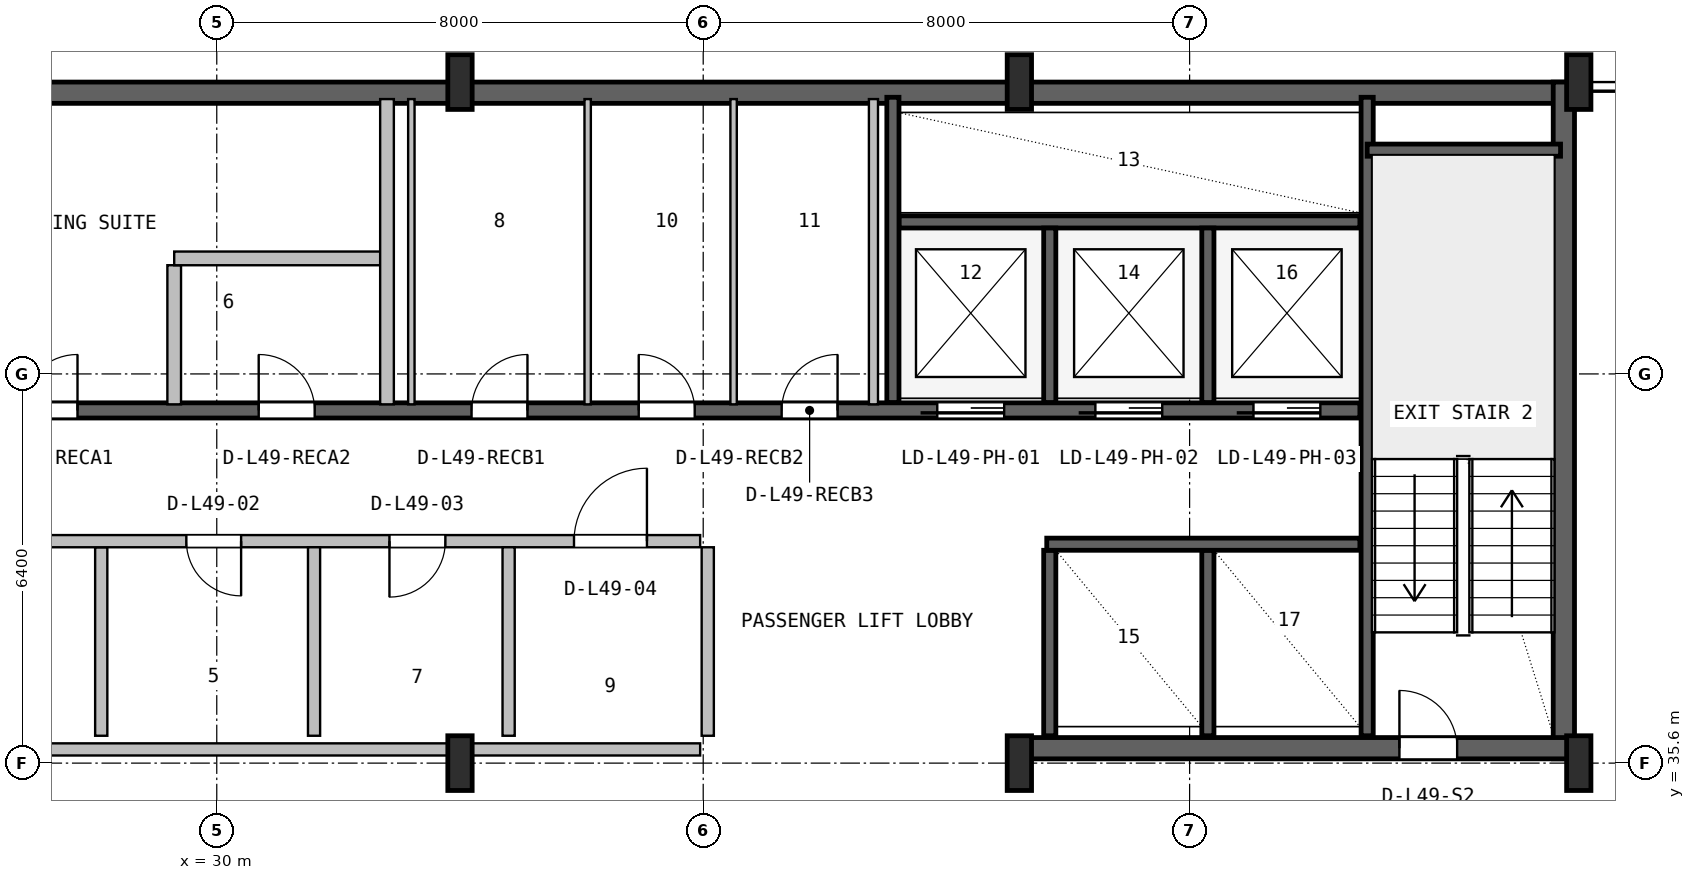
"""IFC4 building model, lengths in metres.
Left out: names, types, materials, properties, quantities, classifications, styles, units other than length and angle.
Written with IfcOpenShell. Run it as: python <this file> out.ifc"""

import sys

from ifc_helpers import new_model, si_unit, direction, frame, frame_2d, origin, origin_2d, place, context, subcontext, project, spatial, rectangle, i_section, extrude, source, transform, mapped, element, fill, save


model = new_model("IFC4")
c1 = context("Model", 3, precision=1e-05, world=origin(), true_north=direction((0.0, 1.0)))
c2 = subcontext(c1, "Body", "Model", "MODEL_VIEW")
j1 = project(units=[si_unit("LENGTHUNIT", "METRE"), si_unit("PLANEANGLEUNIT", "RADIAN")], contexts=[c1])
p1 = place(None, origin())
s1 = spatial("IfcSite", under=j1, at=p1, CompositionType="ELEMENT")
p2 = place(p1, origin())
s2 = spatial("IfcBuilding", under=s1, at=p2, CompositionType="ELEMENT")
p3 = place(p2, frame((0.0, 0.0, 199.8)))
s3 = spatial("IfcBuildingStorey", under=s2, at=p3, CompositionType="ELEMENT", Elevation=199.8)
p4 = place(p3, frame((15.6, 46.625, 0.0), z_axis=(0.0, 0.0, 1.0), x_axis=(1.0, 0.0, 0.0)))
e1 = element("IfcWall", 1, at=p4, inside=s3, PredefinedType="SHEAR", context=c2, shape_type="SweptSolid", body=[
    extrude(rectangle(XDim=36.8, YDim=0.35, at=frame_2d((18.4, 0.0))), origin(), (0.0, 0.0, 1.0), 3.55),
])
p5 = place(p3, frame((52.155, 35.67, 0.0), z_axis=(0.0, 0.0, 1.0), x_axis=(0.0, 1.0, 0.0)))
e2 = element("IfcWall", 2, at=p5, inside=s3, PredefinedType="SHEAR", context=c2, shape_type="SweptSolid", body=[
    extrude(rectangle(XDim=11.13, YDim=0.35, at=frame_2d((5.565, 0.0))), origin(), (0.0, 0.0, 1.0), 3.55),
])
p6 = place(p3, frame((43.2, 35.845, 0.0), z_axis=(0.0, 0.0, 1.0), x_axis=(1.0, 0.0, 0.0)))
e3 = element("IfcWall", 3, at=p6, inside=s3, PredefinedType="SHEAR", context=c2, shape_type="SweptSolid", body=[
    extrude(rectangle(XDim=9.13, YDim=0.35, at=frame_2d((4.565, 0.0))), origin(), (0.0, 0.0, 1.0), 3.55),
])
p7 = place(p6, frame((6.25, 0.0, 0.0)))
e4 = element("IfcOpeningElement", 4, at=p7, cuts=e3, PredefinedType="OPENING", context=c2, shape_type="SweptSolid", body=[
    extrude(rectangle(XDim=0.95, YDim=2.1, at=frame_2d((0.475, 1.05))), frame((0.0, 0.185, 0.0), z_axis=(0.0, -1.0, 0.0), x_axis=(1.0, 0.0, 0.0)), (0.0, 0.0, 1.0), 0.37),
])
m1 = source(origin(), c2, "Body", "SweptSolid", [
    extrude(i_section(OverallWidth=0.4, OverallDepth=0.9, WebThickness=0.016, FlangeThickness=0.028, FilletRadius=0.016, at=origin_2d()), origin(), (0.0, 0.0, 1.0), 3.8),
])
for number, where, z_axis, x_axis in (
    (5, (34.0, 35.6, 0.0), (0.0, 0.0, 1.0), (1.0, 0.0, 0.0)),
    (6, (34.0, 46.8, 0.0), (0.0, 0.0, 1.0), (1.0, 0.0, 0.0)),
    (7, (43.2, 35.6, 0.0), (0.0, 0.0, 1.0), (1.0, 0.0, 0.0)),
    (8, (43.2, 46.8, 0.0), (0.0, 0.0, 1.0), (1.0, 0.0, 0.0)),
    (9, (52.4, 35.6, 0.0), (0.0, 0.0, 1.0), (1.0, 0.0, 0.0)),
    (10, (52.4, 46.8, 0.0), (0.0, 0.0, 1.0), (1.0, 0.0, 0.0)),
):
    element("IfcColumn", number, at=place(p3, frame(where, z_axis=z_axis, x_axis=x_axis)), inside=s3, PredefinedType="COLUMN", context=c2, shape_type="MappedRepresentation", body=[
        mapped(m1, transform((0.0, 0.0, 0.0), x_axis=(1.0, 0.0, 0.0), y_axis=(0.0, 1.0, 0.0), z_axis=(0.0, 0.0, 1.0), scale=1.0)),
    ])
p8 = place(p3, frame((48.92, 36.05, 0.0), z_axis=(0.0, 0.0, 1.0), x_axis=(0.0, 1.0, 0.0)))
e11 = element("IfcWall", 11, at=p8, inside=s3, PredefinedType="SHEAR", context=c2, shape_type="SweptSolid", body=[
    extrude(rectangle(XDim=10.5, YDim=0.2, at=frame_2d((5.25, 0.0))), origin(), (0.0, 0.0, 1.0), 3.55),
])
p9 = place(p3, frame((48.92, 45.68, 0.0), z_axis=(0.0, 0.0, 1.0), x_axis=(1.0, 0.0, 0.0)))
e12 = element("IfcWall", 12, at=p9, inside=s3, PredefinedType="SHEAR", context=c2, shape_type="SweptSolid", body=[
    extrude(rectangle(XDim=3.18, YDim=0.2, at=frame_2d((1.59, 0.0))), origin(), (0.0, 0.0, 1.0), 3.55),
])
p10 = place(p3, frame((24.98, 41.4, 0.0), z_axis=(0.0, 0.0, 1.0), x_axis=(1.0, 0.0, 0.0)))
e13 = element("IfcWall", 13, at=p10, inside=s3, PredefinedType="SHEAR", context=c2, shape_type="SweptSolid", body=[
    extrude(rectangle(XDim=23.82, YDim=0.25, at=frame_2d((11.91, 0.0))), origin(), (0.0, 0.0, 1.0), 3.55),
])
p11 = place(p10, frame((16.87, 0.0, 0.0)))
e14 = element("IfcOpeningElement", 14, at=p11, cuts=e13, PredefinedType="OPENING", context=c2, shape_type="SweptSolid", body=[
    extrude(rectangle(XDim=1.1, YDim=2.18, at=frame_2d((0.55, 1.09))), frame((0.0, 0.135, 0.0), z_axis=(0.0, -1.0, 0.0), x_axis=(1.0, 0.0, 0.0)), (0.0, 0.0, 1.0), 0.27),
])
p12 = place(p10, frame((19.47, 0.0, 0.0)))
e15 = element("IfcOpeningElement", 15, at=p12, cuts=e13, PredefinedType="OPENING", context=c2, shape_type="SweptSolid", body=[
    extrude(rectangle(XDim=1.1, YDim=2.18, at=frame_2d((0.55, 1.09))), frame((0.0, 0.135, 0.0), z_axis=(0.0, -1.0, 0.0), x_axis=(1.0, 0.0, 0.0)), (0.0, 0.0, 1.0), 0.27),
])
p13 = place(p10, frame((22.07, 0.0, 0.0)))
e16 = element("IfcOpeningElement", 16, at=p13, cuts=e13, PredefinedType="OPENING", context=c2, shape_type="SweptSolid", body=[
    extrude(rectangle(XDim=1.1, YDim=2.18, at=frame_2d((0.55, 1.09))), frame((0.0, 0.135, 0.0), z_axis=(0.0, -1.0, 0.0), x_axis=(1.0, 0.0, 0.0)), (0.0, 0.0, 1.0), 0.27),
])
p14 = place(p10, frame((1.81, 0.0, 0.0)))
e17 = element("IfcOpeningElement", 17, at=p14, cuts=e13, PredefinedType="OPENING", context=c2, shape_type="SweptSolid", body=[
    extrude(rectangle(XDim=0.92, YDim=2.08, at=frame_2d((0.46, 1.04))), frame((0.0, 0.135, 0.0), z_axis=(0.0, -1.0, 0.0), x_axis=(1.0, 0.0, 0.0)), (0.0, 0.0, 1.0), 0.27),
])
p15 = place(p10, frame((5.71, 0.0, 0.0)))
e18 = element("IfcOpeningElement", 18, at=p15, cuts=e13, PredefinedType="OPENING", context=c2, shape_type="SweptSolid", body=[
    extrude(rectangle(XDim=0.92, YDim=2.08, at=frame_2d((0.46, 1.04))), frame((0.0, 0.135, 0.0), z_axis=(0.0, -1.0, 0.0), x_axis=(1.0, 0.0, 0.0)), (0.0, 0.0, 1.0), 0.27),
])
p16 = place(p10, frame((9.21, 0.0, 0.0)))
e19 = element("IfcOpeningElement", 19, at=p16, cuts=e13, PredefinedType="OPENING", context=c2, shape_type="SweptSolid", body=[
    extrude(rectangle(XDim=0.92, YDim=2.08, at=frame_2d((0.46, 1.04))), frame((0.0, 0.135, 0.0), z_axis=(0.0, -1.0, 0.0), x_axis=(1.0, 0.0, 0.0)), (0.0, 0.0, 1.0), 0.27),
])
p17 = place(p10, frame((11.96, 0.0, 0.0)))
e20 = element("IfcOpeningElement", 20, at=p17, cuts=e13, PredefinedType="OPENING", context=c2, shape_type="SweptSolid", body=[
    extrude(rectangle(XDim=0.92, YDim=2.08, at=frame_2d((0.46, 1.04))), frame((0.0, 0.135, 0.0), z_axis=(0.0, -1.0, 0.0), x_axis=(1.0, 0.0, 0.0)), (0.0, 0.0, 1.0), 0.27),
])
p18 = place(p10, frame((14.31, 0.0, 0.0)))
e21 = element("IfcOpeningElement", 21, at=p18, cuts=e13, PredefinedType="OPENING", context=c2, shape_type="SweptSolid", body=[
    extrude(rectangle(XDim=0.92, YDim=2.08, at=frame_2d((0.46, 1.04))), frame((0.0, 0.135, 0.0), z_axis=(0.0, -1.0, 0.0), x_axis=(1.0, 0.0, 0.0)), (0.0, 0.0, 1.0), 0.27),
])
p19 = place(p3, frame((41.22, 44.5, 0.0), z_axis=(0.0, 0.0, 1.0), x_axis=(1.0, 0.0, 0.0)))
e22 = element("IfcWall", 22, at=p19, inside=s3, PredefinedType="SHEAR", context=c2, shape_type="SweptSolid", body=[
    extrude(rectangle(XDim=7.58, YDim=0.2, at=frame_2d((3.79, 0.0))), origin(), (0.0, 0.0, 1.0), 3.55),
])
p20 = place(p3, frame((41.12, 41.53, 0.0), z_axis=(0.0, 0.0, 1.0), x_axis=(0.0, 1.0, 0.0)))
e23 = element("IfcWall", 23, at=p20, inside=s3, PredefinedType="SHEAR", context=c2, shape_type="SweptSolid", body=[
    extrude(rectangle(XDim=5.02, YDim=0.2, at=frame_2d((2.51, 0.0))), origin(), (0.0, 0.0, 1.0), 3.55),
])
for number, where, z_axis, x_axis in (
    (24, (43.7, 41.53, 0.0), (0.0, 0.0, 1.0), (0.0, 1.0, 0.0)),
    (25, (46.3, 41.53, 0.0), (0.0, 0.0, 1.0), (0.0, 1.0, 0.0)),
):
    element("IfcWall", number, at=place(p3, frame(where, z_axis=z_axis, x_axis=x_axis)), inside=s3, PredefinedType="SHEAR", context=c2, shape_type="SweptSolid", body=[
        extrude(rectangle(XDim=2.87, YDim=0.2, at=frame_2d((1.435, 0.0))), origin(), (0.0, 0.0, 1.0), 3.55),
    ])
for number, where, z_axis, x_axis in (
    (26, (43.7, 36.05, 0.0), (0.0, 0.0, 1.0), (0.0, 1.0, 0.0)),
    (27, (46.3, 36.05, 0.0), (0.0, 0.0, 1.0), (0.0, 1.0, 0.0)),
):
    element("IfcWall", number, at=place(p3, frame(where, z_axis=z_axis, x_axis=x_axis)), inside=s3, PredefinedType="SHEAR", context=c2, shape_type="SweptSolid", body=[
        extrude(rectangle(XDim=3.05, YDim=0.2, at=frame_2d((1.525, 0.0))), origin(), (0.0, 0.0, 1.0), 3.55),
    ])
p21 = place(p3, frame((43.65, 39.2, 0.0), z_axis=(0.0, 0.0, 1.0), x_axis=(1.0, 0.0, 0.0)))
e28 = element("IfcWall", 28, at=p21, inside=s3, PredefinedType="SHEAR", context=c2, shape_type="SweptSolid", body=[
    extrude(rectangle(XDim=5.15, YDim=0.2, at=frame_2d((2.575, 0.0))), origin(), (0.0, 0.0, 1.0), 3.55),
])
p22 = place(p3, frame((25.0, 35.825, 0.0), z_axis=(0.0, 0.0, 1.0), x_axis=(1.0, 0.0, 0.0)))
e29 = element("IfcWall", 29, at=p22, inside=s3, PredefinedType="SOLIDWALL", context=c2, shape_type="SweptSolid", body=[
    extrude(rectangle(XDim=12.95, YDim=0.2, at=frame_2d((6.475, 0.0))), origin(), (0.0, 0.0, 1.0), 2.575),
])
p23 = place(p3, frame((28.1, 36.05, 0.0), z_axis=(0.0, 0.0, 1.0), x_axis=(0.0, 1.0, 0.0)))
e30 = element("IfcWall", 30, at=p23, inside=s3, PredefinedType="PLUMBINGWALL", context=c2, shape_type="SweptSolid", body=[
    extrude(rectangle(XDim=3.1, YDim=0.2, at=frame_2d((1.55, 0.0))), origin(), (0.0, 0.0, 1.0), 3.53),
])
p24 = place(p3, frame((25.0, 39.25, 0.0), z_axis=(0.0, 0.0, 1.0), x_axis=(1.0, 0.0, 0.0)))
e31 = element("IfcWall", 31, at=p24, inside=s3, PredefinedType="SOLIDWALL", context=c2, shape_type="SweptSolid", body=[
    extrude(rectangle(XDim=12.95, YDim=0.2, at=frame_2d((6.475, 0.0))), origin(), (0.0, 0.0, 1.0), 3.53),
])
p25 = place(p24, frame((1.1, 0.0, 0.0)))
e32 = element("IfcOpeningElement", 32, at=p25, cuts=e31, PredefinedType="OPENING", context=c2, shape_type="SweptSolid", body=[
    extrude(rectangle(XDim=0.9, YDim=2.06, at=frame_2d((0.45, 1.03))), frame((0.0, 0.11, 0.0), z_axis=(0.0, -1.0, 0.0), x_axis=(1.0, 0.0, 0.0)), (0.0, 0.0, 1.0), 0.22),
])
p26 = place(p24, frame((4.5, 0.0, 0.0)))
e33 = element("IfcOpeningElement", 33, at=p26, cuts=e31, PredefinedType="OPENING", context=c2, shape_type="SweptSolid", body=[
    extrude(rectangle(XDim=0.9, YDim=2.06, at=frame_2d((0.45, 1.03))), frame((0.0, 0.11, 0.0), z_axis=(0.0, -1.0, 0.0), x_axis=(1.0, 0.0, 0.0)), (0.0, 0.0, 1.0), 0.22),
])
p27 = place(p24, frame((7.84, 0.0, 0.0)))
e34 = element("IfcOpeningElement", 34, at=p27, cuts=e31, PredefinedType="OPENING", context=c2, shape_type="SweptSolid", body=[
    extrude(rectangle(XDim=0.92, YDim=2.08, at=frame_2d((0.46, 1.04))), frame((0.0, 0.11, 0.0), z_axis=(0.0, -1.0, 0.0), x_axis=(1.0, 0.0, 0.0)), (0.0, 0.0, 1.0), 0.22),
])
p28 = place(p24, frame((10.875, 0.0, 0.0)))
e35 = element("IfcOpeningElement", 35, at=p28, cuts=e31, PredefinedType="OPENING", context=c2, shape_type="SweptSolid", body=[
    extrude(rectangle(XDim=1.2, YDim=2.1, at=frame_2d((0.6, 1.05))), frame((0.0, 0.11, 0.0), z_axis=(0.0, -1.0, 0.0), x_axis=(1.0, 0.0, 0.0)), (0.0, 0.0, 1.0), 0.22),
])
p29 = place(p3, frame((31.6, 36.05, 0.0), z_axis=(0.0, 0.0, 1.0), x_axis=(0.0, 1.0, 0.0)))
e36 = element("IfcWall", 36, at=p29, inside=s3, PredefinedType="PLUMBINGWALL", context=c2, shape_type="SweptSolid", body=[
    extrude(rectangle(XDim=3.1, YDim=0.2, at=frame_2d((1.55, 0.0))), origin(), (0.0, 0.0, 1.0), 3.53),
])
for number, where, z_axis, x_axis in (
    (37, (34.8, 36.05, 0.0), (0.0, 0.0, 1.0), (0.0, 1.0, 0.0)),
    (38, (38.075, 36.05, 0.0), (0.0, 0.0, 1.0), (0.0, 1.0, 0.0)),
):
    element("IfcWall", number, at=place(p3, frame(where, z_axis=z_axis, x_axis=x_axis)), inside=s3, PredefinedType="SOLIDWALL", context=c2, shape_type="SweptSolid", body=[
        extrude(rectangle(XDim=3.1, YDim=0.2, at=frame_2d((1.55, 0.0))), origin(), (0.0, 0.0, 1.0), 3.53),
    ])
p30 = place(p3, frame((29.3, 41.5, 0.0), z_axis=(0.0, 0.0, 1.0), x_axis=(0.0, 1.0, 0.0)))
e39 = element("IfcWall", 39, at=p30, inside=s3, PredefinedType="PARTITIONING", context=c2, shape_type="SweptSolid", body=[
    extrude(rectangle(XDim=2.288, YDim=0.225, at=frame_2d((1.144, 0.0))), origin(), (0.0, 0.0, 1.0), 3.53),
])
p31 = place(p3, frame((29.3, 43.9, 0.0), z_axis=(0.0, 0.0, 1.0), x_axis=(1.0, 0.0, 0.0)))
e40 = element("IfcWall", 40, at=p31, inside=s3, PredefinedType="PARTITIONING", context=c2, shape_type="SweptSolid", body=[
    extrude(rectangle(XDim=3.5, YDim=0.225, at=frame_2d((1.75, 0.0))), origin(), (0.0, 0.0, 1.0), 3.53),
])
p32 = place(p3, frame((32.8, 41.5, 0.0), z_axis=(0.0, 0.0, 1.0), x_axis=(0.0, 1.0, 0.0)))
e41 = element("IfcWall", 41, at=p32, inside=s3, PredefinedType="PARTITIONING", context=c2, shape_type="SweptSolid", body=[
    extrude(rectangle(XDim=5.02, YDim=0.225, at=frame_2d((2.51, 0.0))), origin(), (0.0, 0.0, 1.0), 3.53),
])
for number, where, z_axis, x_axis in (
    (42, (36.1, 41.5, 0.0), (0.0, 0.0, 1.0), (0.0, 1.0, 0.0)),
    (43, (33.2, 41.5, 0.0), (0.0, 0.0, 1.0), (0.0, 1.0, 0.0)),
    (44, (38.5, 41.5, 0.0), (0.0, 0.0, 1.0), (0.0, 1.0, 0.0)),
):
    element("IfcWall", number, at=place(p3, frame(where, z_axis=z_axis, x_axis=x_axis)), inside=s3, PredefinedType="PARTITIONING", context=c2, shape_type="SweptSolid", body=[
        extrude(rectangle(XDim=5.02, YDim=0.105, at=frame_2d((2.51, 0.0))), origin(), (0.0, 0.0, 1.0), 3.53),
    ])
p33 = place(p3, frame((40.8, 41.5, 0.0), z_axis=(0.0, 0.0, 1.0), x_axis=(0.0, 1.0, 0.0)))
e45 = element("IfcWall", 45, at=p33, inside=s3, PredefinedType="PARTITIONING", context=c2, shape_type="SweptSolid", body=[
    extrude(rectangle(XDim=5.02, YDim=0.15, at=frame_2d((2.51, 0.0))), origin(), (0.0, 0.0, 1.0), 3.53),
])
m2 = source(origin(), c2, "Body", "SweptSolid", [
    extrude(rectangle(XDim=0.95, YDim=2.1, at=frame_2d((0.475, 1.05))), frame((0.0, 0.025, 0.0), z_axis=(0.0, -1.0, 0.0), x_axis=(1.0, 0.0, 0.0)), (0.0, 0.0, 1.0), 0.05),
])
p34 = place(p7, origin())
e46 = element("IfcDoor", 46, at=p34, inside=s3, OperationType="SINGLE_SWING_LEFT", PredefinedType="DOOR", context=c2, shape_type="MappedRepresentation", body=[
    mapped(m2, transform((0.0, 0.0, 0.0), x_axis=(1.0, 0.0, 0.0), y_axis=(0.0, 1.0, 0.0), z_axis=(0.0, 0.0, 1.0), scale=1.0)),
])
fill(e4, e46)
m3 = source(origin(), c2, "Body", "SweptSolid", [
    extrude(rectangle(XDim=1.1, YDim=2.18, at=frame_2d((0.55, 1.09))), frame((0.0, 0.025, 0.0), z_axis=(0.0, -1.0, 0.0), x_axis=(1.0, 0.0, 0.0)), (0.0, 0.0, 1.0), 0.05),
])
p35 = place(p11, frame((1.1, 0.0, 0.0), z_axis=(0.0, 0.0, 1.0), x_axis=(-1.0, 0.0, 0.0)))
e47 = element("IfcDoor", 47, at=p35, inside=s3, OperationType="SLIDING_TO_LEFT", PredefinedType="DOOR", context=c2, shape_type="MappedRepresentation", body=[
    mapped(m3, transform((0.0, 0.0, 0.0), x_axis=(1.0, 0.0, 0.0), y_axis=(0.0, 1.0, 0.0), z_axis=(0.0, 0.0, 1.0), scale=1.0)),
])
fill(e14, e47)
p36 = place(p12, frame((1.1, 0.0, 0.0), z_axis=(0.0, 0.0, 1.0), x_axis=(-1.0, 0.0, 0.0)))
e48 = element("IfcDoor", 48, at=p36, inside=s3, OperationType="SLIDING_TO_LEFT", PredefinedType="DOOR", context=c2, shape_type="MappedRepresentation", body=[
    mapped(m3, transform((0.0, 0.0, 0.0), x_axis=(1.0, 0.0, 0.0), y_axis=(0.0, 1.0, 0.0), z_axis=(0.0, 0.0, 1.0), scale=1.0)),
])
fill(e15, e48)
p37 = place(p13, frame((1.1, 0.0, 0.0), z_axis=(0.0, 0.0, 1.0), x_axis=(-1.0, 0.0, 0.0)))
e49 = element("IfcDoor", 49, at=p37, inside=s3, OperationType="SLIDING_TO_LEFT", PredefinedType="DOOR", context=c2, shape_type="MappedRepresentation", body=[
    mapped(m3, transform((0.0, 0.0, 0.0), x_axis=(1.0, 0.0, 0.0), y_axis=(0.0, 1.0, 0.0), z_axis=(0.0, 0.0, 1.0), scale=1.0)),
])
fill(e16, e49)
m4 = source(origin(), c2, "Body", "SweptSolid", [
    extrude(rectangle(XDim=0.92, YDim=2.08, at=frame_2d((0.46, 1.04))), frame((0.0, 0.025, 0.0), z_axis=(0.0, -1.0, 0.0), x_axis=(1.0, 0.0, 0.0)), (0.0, 0.0, 1.0), 0.05),
])
p38 = place(p14, origin())
e50 = element("IfcDoor", 50, at=p38, inside=s3, OperationType="SINGLE_SWING_RIGHT", PredefinedType="DOOR", context=c2, shape_type="MappedRepresentation", body=[
    mapped(m4, transform((0.0, 0.0, 0.0), x_axis=(1.0, 0.0, 0.0), y_axis=(0.0, 1.0, 0.0), z_axis=(0.0, 0.0, 1.0), scale=1.0)),
])
fill(e17, e50)
p39 = place(p15, origin())
e51 = element("IfcDoor", 51, at=p39, inside=s3, OperationType="SINGLE_SWING_LEFT", PredefinedType="DOOR", context=c2, shape_type="MappedRepresentation", body=[
    mapped(m4, transform((0.0, 0.0, 0.0), x_axis=(1.0, 0.0, 0.0), y_axis=(0.0, 1.0, 0.0), z_axis=(0.0, 0.0, 1.0), scale=1.0)),
])
fill(e18, e51)
p40 = place(p16, origin())
e52 = element("IfcDoor", 52, at=p40, inside=s3, OperationType="SINGLE_SWING_RIGHT", PredefinedType="DOOR", context=c2, shape_type="MappedRepresentation", body=[
    mapped(m4, transform((0.0, 0.0, 0.0), x_axis=(1.0, 0.0, 0.0), y_axis=(0.0, 1.0, 0.0), z_axis=(0.0, 0.0, 1.0), scale=1.0)),
])
fill(e19, e52)
p41 = place(p17, origin())
e53 = element("IfcDoor", 53, at=p41, inside=s3, OperationType="SINGLE_SWING_LEFT", PredefinedType="DOOR", context=c2, shape_type="MappedRepresentation", body=[
    mapped(m4, transform((0.0, 0.0, 0.0), x_axis=(1.0, 0.0, 0.0), y_axis=(0.0, 1.0, 0.0), z_axis=(0.0, 0.0, 1.0), scale=1.0)),
])
fill(e20, e53)
p42 = place(p18, origin())
e54 = element("IfcDoor", 54, at=p42, inside=s3, OperationType="SINGLE_SWING_RIGHT", PredefinedType="DOOR", context=c2, shape_type="MappedRepresentation", body=[
    mapped(m4, transform((0.0, 0.0, 0.0), x_axis=(1.0, 0.0, 0.0), y_axis=(0.0, 1.0, 0.0), z_axis=(0.0, 0.0, 1.0), scale=1.0)),
])
fill(e21, e54)
m5 = source(origin(), c2, "Body", "SweptSolid", [
    extrude(rectangle(XDim=0.9, YDim=2.06, at=frame_2d((0.45, 1.03))), frame((0.0, 0.025, 0.0), z_axis=(0.0, -1.0, 0.0), x_axis=(1.0, 0.0, 0.0)), (0.0, 0.0, 1.0), 0.05),
])
p43 = place(p26, frame((0.9, 0.0, 0.0), z_axis=(0.0, 0.0, 1.0), x_axis=(-1.0, 0.0, 0.0)))
e55 = element("IfcDoor", 55, at=p43, inside=s3, OperationType="SINGLE_SWING_RIGHT", PredefinedType="DOOR", context=c2, shape_type="MappedRepresentation", body=[
    mapped(m5, transform((0.0, 0.0, 0.0), x_axis=(1.0, 0.0, 0.0), y_axis=(0.0, 1.0, 0.0), z_axis=(0.0, 0.0, 1.0), scale=1.0)),
])
fill(e33, e55)
p44 = place(p27, frame((0.92, 0.0, 0.0), z_axis=(0.0, 0.0, 1.0), x_axis=(-1.0, 0.0, 0.0)))
e56 = element("IfcDoor", 56, at=p44, inside=s3, OperationType="SINGLE_SWING_LEFT", PredefinedType="DOOR", context=c2, shape_type="MappedRepresentation", body=[
    mapped(m4, transform((0.0, 0.0, 0.0), x_axis=(1.0, 0.0, 0.0), y_axis=(0.0, 1.0, 0.0), z_axis=(0.0, 0.0, 1.0), scale=1.0)),
])
fill(e34, e56)
m6 = source(origin(), c2, "Body", "SweptSolid", [
    extrude(rectangle(XDim=1.2, YDim=2.1, at=frame_2d((0.6, 1.05))), frame((0.0, 0.025, 0.0), z_axis=(0.0, -1.0, 0.0), x_axis=(1.0, 0.0, 0.0)), (0.0, 0.0, 1.0), 0.05),
])
p45 = place(p28, origin())
e57 = element("IfcDoor", 57, at=p45, inside=s3, OperationType="SINGLE_SWING_RIGHT", PredefinedType="DOOR", context=c2, shape_type="MappedRepresentation", body=[
    mapped(m6, transform((0.0, 0.0, 0.0), x_axis=(1.0, 0.0, 0.0), y_axis=(0.0, 1.0, 0.0), z_axis=(0.0, 0.0, 1.0), scale=1.0)),
])
fill(e35, e57)
save(model, sys.argv[1])
